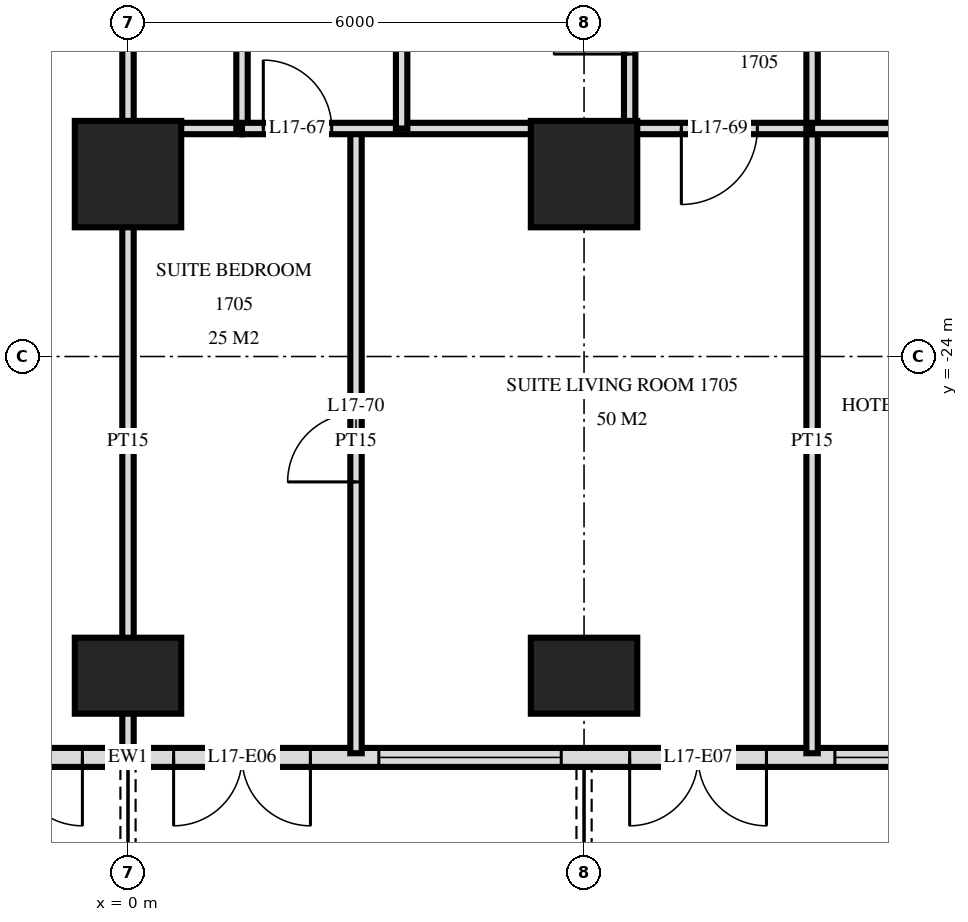
"""IFC4 building model, lengths in metres.
Left out: names, types, materials, properties, quantities, classifications, styles, units other than length and angle.
Written with IfcOpenShell. Run it as: python <this file> out.ifc"""

import sys

from ifc_helpers import new_model, si_unit, direction, frame, frame_2d, origin, origin_2d, place, context, subcontext, project, spatial, rectangle, extrude, element, fill, save


model = new_model("IFC4")
c1 = context("Model", 3, precision=1e-05, world=origin(), true_north=direction((0.0, 1.0)))
c2 = subcontext(c1, "Body", "Model", "MODEL_VIEW")
j1 = project(units=[si_unit("LENGTHUNIT", "METRE"), si_unit("PLANEANGLEUNIT", "RADIAN")], contexts=[c1])
p1 = place(None, origin())
s1 = spatial("IfcSite", under=j1, at=p1, CompositionType="ELEMENT")
p2 = place(p1, origin())
s2 = spatial("IfcBuilding", under=s1, at=p2, CompositionType="ELEMENT")
p3 = place(p2, frame((0.0, 0.0, 70.8)))
s3 = spatial("IfcBuildingStorey", under=s2, at=p3, CompositionType="ELEMENT", Elevation=70.8)
p4 = place(p3, frame((0.0, -28.2, 0.0), z_axis=(0.0, 0.0, 1.0), x_axis=(1.0, 0.0, 0.0)))
e1 = element("IfcColumn", 1, at=p4, inside=s3, PredefinedType="COLUMN", context=c2, shape_type="SweptSolid", body=[
    extrude(rectangle(XDim=1.4, YDim=1.0, at=origin_2d()), origin(), (0.0, 0.0, 1.0), 3.6),
])
p5 = place(p3, frame((0.0, -21.6, 0.0), z_axis=(0.0, 0.0, 1.0), x_axis=(1.0, 0.0, 0.0)))
e2 = element("IfcColumn", 2, at=p5, inside=s3, PredefinedType="COLUMN", context=c2, shape_type="SweptSolid", body=[
    extrude(rectangle(XDim=1.4, YDim=1.4, at=origin_2d()), origin(), (0.0, 0.0, 1.0), 3.6),
])
p6 = place(p3, frame((6.0, -28.2, 0.0), z_axis=(0.0, 0.0, 1.0), x_axis=(1.0, 0.0, 0.0)))
e3 = element("IfcColumn", 3, at=p6, inside=s3, PredefinedType="COLUMN", context=c2, shape_type="SweptSolid", body=[
    extrude(rectangle(XDim=1.4, YDim=1.0, at=origin_2d()), origin(), (0.0, 0.0, 1.0), 3.6),
])
p7 = place(p3, frame((6.0, -21.6, 0.0), z_axis=(0.0, 0.0, 1.0), x_axis=(1.0, 0.0, 0.0)))
e4 = element("IfcColumn", 4, at=p7, inside=s3, PredefinedType="COLUMN", context=c2, shape_type="SweptSolid", body=[
    extrude(rectangle(XDim=1.4, YDim=1.4, at=origin_2d()), origin(), (0.0, 0.0, 1.0), 3.6),
])
p8 = place(p3, frame((-28.775, -29.275, 0.0), z_axis=(0.0, 0.0, 1.0), x_axis=(1.0, 0.0, 0.0)))
e5 = element("IfcWall", 5, at=p8, inside=s3, PredefinedType="SOLIDWALL", context=c2, shape_type="SweptSolid", body=[
    extrude(rectangle(XDim=57.551, YDim=0.25, at=frame_2d((28.775, 0.0))), origin(), (0.0, 0.0, 1.0), 3.32),
])
p9 = place(p8, frame((0.575, 0.0, 0.0)))
e6 = element("IfcOpeningElement", 6, at=p9, cuts=e5, PredefinedType="OPENING", context=c2, shape_type="SweptSolid", body=[
    extrude(rectangle(XDim=1.8, YDim=2.4, at=frame_2d((0.9, 1.2))), frame((0.0, 0.135, 0.0), z_axis=(0.0, -1.0, 0.0), x_axis=(1.0, 0.0, 0.0)), (0.0, 0.0, 1.0), 0.27),
])
p10 = place(p8, frame((5.075, 0.0, 0.3)))
e7 = element("IfcOpeningElement", 7, at=p10, cuts=e5, PredefinedType="OPENING", context=c2, shape_type="SweptSolid", body=[
    extrude(rectangle(XDim=2.4, YDim=2.1, at=frame_2d((1.2, 1.05))), frame((0.0, 0.135, 0.0), z_axis=(0.0, -1.0, 0.0), x_axis=(1.0, 0.0, 0.0)), (0.0, 0.0, 1.0), 0.27),
])
p11 = place(p8, frame((8.375, 0.0, 0.0)))
e8 = element("IfcOpeningElement", 8, at=p11, cuts=e5, PredefinedType="OPENING", context=c2, shape_type="SweptSolid", body=[
    extrude(rectangle(XDim=1.8, YDim=2.4, at=frame_2d((0.9, 1.2))), frame((0.0, 0.135, 0.0), z_axis=(0.0, -1.0, 0.0), x_axis=(1.0, 0.0, 0.0)), (0.0, 0.0, 1.0), 0.27),
])
p12 = place(p8, frame((11.375, 0.0, 0.0)))
e9 = element("IfcOpeningElement", 9, at=p12, cuts=e5, PredefinedType="OPENING", context=c2, shape_type="SweptSolid", body=[
    extrude(rectangle(XDim=1.8, YDim=2.4, at=frame_2d((0.9, 1.2))), frame((0.0, 0.135, 0.0), z_axis=(0.0, -1.0, 0.0), x_axis=(1.0, 0.0, 0.0)), (0.0, 0.0, 1.0), 0.27),
])
p13 = place(p8, frame((14.075, 0.0, 0.3)))
e10 = element("IfcOpeningElement", 10, at=p13, cuts=e5, PredefinedType="OPENING", context=c2, shape_type="SweptSolid", body=[
    extrude(rectangle(XDim=2.4, YDim=2.1, at=frame_2d((1.2, 1.05))), frame((0.0, 0.135, 0.0), z_axis=(0.0, -1.0, 0.0), x_axis=(1.0, 0.0, 0.0)), (0.0, 0.0, 1.0), 0.27),
])
p14 = place(p8, frame((17.375, 0.0, 0.0)))
e11 = element("IfcOpeningElement", 11, at=p14, cuts=e5, PredefinedType="OPENING", context=c2, shape_type="SweptSolid", body=[
    extrude(rectangle(XDim=1.8, YDim=2.4, at=frame_2d((0.9, 1.2))), frame((0.0, 0.135, 0.0), z_axis=(0.0, -1.0, 0.0), x_axis=(1.0, 0.0, 0.0)), (0.0, 0.0, 1.0), 0.27),
])
p15 = place(p8, frame((20.075, 0.0, 0.3)))
e12 = element("IfcOpeningElement", 12, at=p15, cuts=e5, PredefinedType="OPENING", context=c2, shape_type="SweptSolid", body=[
    extrude(rectangle(XDim=2.4, YDim=2.1, at=frame_2d((1.2, 1.05))), frame((0.0, 0.135, 0.0), z_axis=(0.0, -1.0, 0.0), x_axis=(1.0, 0.0, 0.0)), (0.0, 0.0, 1.0), 0.27),
])
p16 = place(p8, frame((23.075, 0.0, 0.3)))
e13 = element("IfcOpeningElement", 13, at=p16, cuts=e5, PredefinedType="OPENING", context=c2, shape_type="SweptSolid", body=[
    extrude(rectangle(XDim=2.4, YDim=2.1, at=frame_2d((1.2, 1.05))), frame((0.0, 0.135, 0.0), z_axis=(0.0, -1.0, 0.0), x_axis=(1.0, 0.0, 0.0)), (0.0, 0.0, 1.0), 0.27),
])
p17 = place(p8, frame((26.375, 0.0, 0.0)))
e14 = element("IfcOpeningElement", 14, at=p17, cuts=e5, PredefinedType="OPENING", context=c2, shape_type="SweptSolid", body=[
    extrude(rectangle(XDim=1.8, YDim=2.4, at=frame_2d((0.9, 1.2))), frame((0.0, 0.135, 0.0), z_axis=(0.0, -1.0, 0.0), x_axis=(1.0, 0.0, 0.0)), (0.0, 0.0, 1.0), 0.27),
])
p18 = place(p8, frame((29.375, 0.0, 0.0)))
e15 = element("IfcOpeningElement", 15, at=p18, cuts=e5, PredefinedType="OPENING", context=c2, shape_type="SweptSolid", body=[
    extrude(rectangle(XDim=1.8, YDim=2.4, at=frame_2d((0.9, 1.2))), frame((0.0, 0.135, 0.0), z_axis=(0.0, -1.0, 0.0), x_axis=(1.0, 0.0, 0.0)), (0.0, 0.0, 1.0), 0.27),
])
p19 = place(p8, frame((32.075, 0.0, 0.3)))
e16 = element("IfcOpeningElement", 16, at=p19, cuts=e5, PredefinedType="OPENING", context=c2, shape_type="SweptSolid", body=[
    extrude(rectangle(XDim=2.4, YDim=2.1, at=frame_2d((1.2, 1.05))), frame((0.0, 0.135, 0.0), z_axis=(0.0, -1.0, 0.0), x_axis=(1.0, 0.0, 0.0)), (0.0, 0.0, 1.0), 0.27),
])
p20 = place(p8, frame((35.375, 0.0, 0.0)))
e17 = element("IfcOpeningElement", 17, at=p20, cuts=e5, PredefinedType="OPENING", context=c2, shape_type="SweptSolid", body=[
    extrude(rectangle(XDim=1.8, YDim=2.4, at=frame_2d((0.9, 1.2))), frame((0.0, 0.135, 0.0), z_axis=(0.0, -1.0, 0.0), x_axis=(1.0, 0.0, 0.0)), (0.0, 0.0, 1.0), 0.27),
])
p21 = place(p8, frame((38.075, 0.0, 0.3)))
e18 = element("IfcOpeningElement", 18, at=p21, cuts=e5, PredefinedType="OPENING", context=c2, shape_type="SweptSolid", body=[
    extrude(rectangle(XDim=2.4, YDim=2.1, at=frame_2d((1.2, 1.05))), frame((0.0, 0.135, 0.0), z_axis=(0.0, -1.0, 0.0), x_axis=(1.0, 0.0, 0.0)), (0.0, 0.0, 1.0), 0.27),
])
p22 = place(p8, frame((41.075, 0.0, 0.3)))
e19 = element("IfcOpeningElement", 19, at=p22, cuts=e5, PredefinedType="OPENING", context=c2, shape_type="SweptSolid", body=[
    extrude(rectangle(XDim=2.4, YDim=2.1, at=frame_2d((1.2, 1.05))), frame((0.0, 0.135, 0.0), z_axis=(0.0, -1.0, 0.0), x_axis=(1.0, 0.0, 0.0)), (0.0, 0.0, 1.0), 0.27),
])
p23 = place(p8, frame((44.375, 0.0, 0.0)))
e20 = element("IfcOpeningElement", 20, at=p23, cuts=e5, PredefinedType="OPENING", context=c2, shape_type="SweptSolid", body=[
    extrude(rectangle(XDim=1.8, YDim=2.4, at=frame_2d((0.9, 1.2))), frame((0.0, 0.135, 0.0), z_axis=(0.0, -1.0, 0.0), x_axis=(1.0, 0.0, 0.0)), (0.0, 0.0, 1.0), 0.27),
])
p24 = place(p8, frame((47.075, 0.0, 0.3)))
e21 = element("IfcOpeningElement", 21, at=p24, cuts=e5, PredefinedType="OPENING", context=c2, shape_type="SweptSolid", body=[
    extrude(rectangle(XDim=2.4, YDim=2.1, at=frame_2d((1.2, 1.05))), frame((0.0, 0.135, 0.0), z_axis=(0.0, -1.0, 0.0), x_axis=(1.0, 0.0, 0.0)), (0.0, 0.0, 1.0), 0.27),
])
p25 = place(p8, frame((50.375, 0.0, 0.0)))
e22 = element("IfcOpeningElement", 22, at=p25, cuts=e5, PredefinedType="OPENING", context=c2, shape_type="SweptSolid", body=[
    extrude(rectangle(XDim=1.8, YDim=2.4, at=frame_2d((0.9, 1.2))), frame((0.0, 0.135, 0.0), z_axis=(0.0, -1.0, 0.0), x_axis=(1.0, 0.0, 0.0)), (0.0, 0.0, 1.0), 0.27),
])
p26 = place(p8, frame((53.375, 0.0, 0.0)))
e23 = element("IfcOpeningElement", 23, at=p26, cuts=e5, PredefinedType="OPENING", context=c2, shape_type="SweptSolid", body=[
    extrude(rectangle(XDim=1.8, YDim=2.4, at=frame_2d((0.9, 1.2))), frame((0.0, 0.135, 0.0), z_axis=(0.0, -1.0, 0.0), x_axis=(1.0, 0.0, 0.0)), (0.0, 0.0, 1.0), 0.27),
])
p27 = place(p3, frame((9.0, -21.0, 0.0), z_axis=(0.0, 0.0, 1.0), x_axis=(0.0, 1.0, 0.0)))
e24 = element("IfcWall", 24, at=p27, inside=s3, PredefinedType="PARTITIONING", context=c2, shape_type="SweptSolid", body=[
    extrude(rectangle(XDim=3.0, YDim=0.15, at=frame_2d((1.5, 0.0))), origin(), (0.0, 0.0, 1.0), 3.32),
])
p28 = place(p3, frame((9.0, -29.22, 0.0), z_axis=(0.0, 0.0, 1.0), x_axis=(0.0, 1.0, 0.0)))
e25 = element("IfcWall", 25, at=p28, inside=s3, PredefinedType="PARTITIONING", context=c2, shape_type="SweptSolid", body=[
    extrude(rectangle(XDim=8.22, YDim=0.15, at=frame_2d((4.11, 0.0))), origin(), (0.0, 0.0, 1.0), 3.32),
])
p29 = place(p3, frame((6.6, -21.0, 0.0), z_axis=(0.0, 0.0, 1.0), x_axis=(0.0, 1.0, 0.0)))
e26 = element("IfcWall", 26, at=p29, inside=s3, PredefinedType="PARTITIONING", context=c2, shape_type="SweptSolid", body=[
    extrude(rectangle(XDim=3.0, YDim=0.15, at=frame_2d((1.5, 0.0))), origin(), (0.0, 0.0, 1.0), 3.32),
])
p30 = place(p29, frame((0.98, 0.0, 0.0)))
e27 = element("IfcOpeningElement", 27, at=p30, cuts=e26, PredefinedType="OPENING", context=c2, shape_type="SweptSolid", body=[
    extrude(rectangle(XDim=1.0, YDim=2.1, at=frame_2d((0.5, 1.05))), frame((0.0, 0.085, 0.0), z_axis=(0.0, -1.0, 0.0), x_axis=(1.0, 0.0, 0.0)), (0.0, 0.0, 1.0), 0.17),
])
p31 = place(p3, frame((3.6, -21.0, 0.0), z_axis=(0.0, 0.0, 1.0), x_axis=(0.0, 1.0, 0.0)))
e28 = element("IfcWall", 28, at=p31, inside=s3, PredefinedType="PARTITIONING", context=c2, shape_type="SweptSolid", body=[
    extrude(rectangle(XDim=3.0, YDim=0.15, at=frame_2d((1.5, 0.0))), origin(), (0.0, 0.0, 1.0), 3.32),
])
p32 = place(p3, frame((3.0, -29.22, 0.0), z_axis=(0.0, 0.0, 1.0), x_axis=(0.0, 1.0, 0.0)))
e29 = element("IfcWall", 29, at=p32, inside=s3, PredefinedType="PARTITIONING", context=c2, shape_type="SweptSolid", body=[
    extrude(rectangle(XDim=8.22, YDim=0.15, at=frame_2d((4.11, 0.0))), origin(), (0.0, 0.0, 1.0), 3.32),
])
p33 = place(p32, frame((3.57, 0.0, 0.0)))
e30 = element("IfcOpeningElement", 30, at=p33, cuts=e29, PredefinedType="OPENING", context=c2, shape_type="SweptSolid", body=[
    extrude(rectangle(XDim=0.9, YDim=2.1, at=frame_2d((0.45, 1.05))), frame((0.0, 0.085, 0.0), z_axis=(0.0, -1.0, 0.0), x_axis=(1.0, 0.0, 0.0)), (0.0, 0.0, 1.0), 0.17),
])
p34 = place(p3, frame((1.5, -21.0, 0.0), z_axis=(0.0, 0.0, 1.0), x_axis=(0.0, 1.0, 0.0)))
e31 = element("IfcWall", 31, at=p34, inside=s3, PredefinedType="PLUMBINGWALL", context=c2, shape_type="SweptSolid", body=[
    extrude(rectangle(XDim=3.0, YDim=0.15, at=frame_2d((1.5, 0.0))), origin(), (0.0, 0.0, 1.0), 3.32),
])
p35 = place(p34, frame((1.08, 0.0, 0.0)))
e32 = element("IfcOpeningElement", 32, at=p35, cuts=e31, PredefinedType="OPENING", context=c2, shape_type="SweptSolid", body=[
    extrude(rectangle(XDim=0.8, YDim=2.1, at=frame_2d((0.4, 1.05))), frame((0.0, 0.085, 0.0), z_axis=(0.0, -1.0, 0.0), x_axis=(1.0, 0.0, 0.0)), (0.0, 0.0, 1.0), 0.17),
])
p36 = place(p3, frame((0.0, -29.22, 0.0), z_axis=(0.0, 0.0, 1.0), x_axis=(0.0, 1.0, 0.0)))
e33 = element("IfcWall", 33, at=p36, inside=s3, PredefinedType="PARTITIONING", context=c2, shape_type="SweptSolid", body=[
    extrude(rectangle(XDim=8.22, YDim=0.15, at=frame_2d((4.11, 0.0))), origin(), (0.0, 0.0, 1.0), 3.32),
])
p37 = place(p3, frame((0.0, -21.0, 0.0), z_axis=(0.0, 0.0, 1.0), x_axis=(0.0, 1.0, 0.0)))
e34 = element("IfcWall", 34, at=p37, inside=s3, PredefinedType="PLUMBINGWALL", context=c2, shape_type="SweptSolid", body=[
    extrude(rectangle(XDim=3.0, YDim=0.15, at=frame_2d((1.5, 0.0))), origin(), (0.0, 0.0, 1.0), 3.32),
])
p38 = place(p3, frame((6.6, -21.0, 0.0), z_axis=(0.0, 0.0, 1.0), x_axis=(1.0, 0.0, 0.0)))
e35 = element("IfcWall", 35, at=p38, inside=s3, PredefinedType="PARTITIONING", context=c2, shape_type="SweptSolid", body=[
    extrude(rectangle(XDim=2.4, YDim=0.15, at=frame_2d((1.2, 0.0))), origin(), (0.0, 0.0, 1.0), 3.32),
])
p39 = place(p38, frame((0.68, 0.0, 0.0)))
e36 = element("IfcOpeningElement", 36, at=p39, cuts=e35, PredefinedType="OPENING", context=c2, shape_type="SweptSolid", body=[
    extrude(rectangle(XDim=1.0, YDim=2.1, at=frame_2d((0.5, 1.05))), frame((0.0, 0.085, 0.0), z_axis=(0.0, -1.0, 0.0), x_axis=(1.0, 0.0, 0.0)), (0.0, 0.0, 1.0), 0.17),
])
p40 = place(p3, frame((1.5, -21.0, 0.0), z_axis=(0.0, 0.0, 1.0), x_axis=(1.0, 0.0, 0.0)))
e37 = element("IfcWall", 37, at=p40, inside=s3, PredefinedType="PARTITIONING", context=c2, shape_type="SweptSolid", body=[
    extrude(rectangle(XDim=5.1, YDim=0.15, at=frame_2d((2.55, 0.0))), origin(), (0.0, 0.0, 1.0), 3.32),
])
p41 = place(p40, frame((0.28, 0.0, 0.0)))
e38 = element("IfcOpeningElement", 38, at=p41, cuts=e37, PredefinedType="OPENING", context=c2, shape_type="SweptSolid", body=[
    extrude(rectangle(XDim=0.9, YDim=2.1, at=frame_2d((0.45, 1.05))), frame((0.0, 0.085, 0.0), z_axis=(0.0, -1.0, 0.0), x_axis=(1.0, 0.0, 0.0)), (0.0, 0.0, 1.0), 0.17),
])
p42 = place(p3, frame((9.0, -21.0, 0.0), z_axis=(0.0, 0.0, 1.0), x_axis=(1.0, 0.0, 0.0)))
e39 = element("IfcWall", 39, at=p42, inside=s3, PredefinedType="PARTITIONING", context=c2, shape_type="SweptSolid", body=[
    extrude(rectangle(XDim=1.7, YDim=0.15, at=frame_2d((0.85, 0.0))), origin(), (0.0, 0.0, 1.0), 3.32),
])
p43 = place(p3, frame((0.0, -21.0, 0.0), z_axis=(0.0, 0.0, 1.0), x_axis=(1.0, 0.0, 0.0)))
e40 = element("IfcWall", 40, at=p43, inside=s3, PredefinedType="PLUMBINGWALL", context=c2, shape_type="SweptSolid", body=[
    extrude(rectangle(XDim=1.5, YDim=0.15, at=frame_2d((0.75, 0.0))), origin(), (0.0, 0.0, 1.0), 3.32),
])
p44 = place(p17, frame((0.9, 0.0, 0.0), z_axis=(0.0, 0.0, 1.0), x_axis=(-1.0, 0.0, 0.0)))
e41 = element("IfcDoor", 41, at=p44, inside=s3, OperationType="DOUBLE_DOOR_SINGLE_SWING", PredefinedType="DOOR", context=c2, shape_type="SweptSolid", body=[
    extrude(rectangle(XDim=1.8, YDim=2.4, at=frame_2d((0.0, 1.2))), frame((0.0, -0.025, 0.0), z_axis=(0.0, 1.0, 0.0), x_axis=(-1.0, 0.0, 0.0)), (0.0, 0.0, 1.0), 0.05),
])
fill(e14, e41)
p45 = place(p18, frame((0.9, 0.0, 0.0), z_axis=(0.0, 0.0, 1.0), x_axis=(-1.0, 0.0, 0.0)))
e42 = element("IfcDoor", 42, at=p45, inside=s3, OperationType="DOUBLE_DOOR_SINGLE_SWING", PredefinedType="DOOR", context=c2, shape_type="SweptSolid", body=[
    extrude(rectangle(XDim=1.8, YDim=2.4, at=frame_2d((0.0, 1.2))), frame((0.0, -0.025, 0.0), z_axis=(0.0, 1.0, 0.0), x_axis=(-1.0, 0.0, 0.0)), (0.0, 0.0, 1.0), 0.05),
])
fill(e15, e42)
p46 = place(p19, origin())
e43 = element("IfcWindow", 43, at=p46, inside=s3, PartitioningType="SINGLE_PANEL", PredefinedType="WINDOW", context=c2, shape_type="SweptSolid", body=[
    extrude(rectangle(XDim=2.4, YDim=2.1, at=frame_2d((1.2, 1.05))), frame((0.0, 0.03, 0.0), z_axis=(0.0, -1.0, 0.0), x_axis=(1.0, 0.0, 0.0)), (0.0, 0.0, 1.0), 0.06),
])
fill(e16, e43)
p47 = place(p20, frame((0.9, 0.0, 0.0), z_axis=(0.0, 0.0, 1.0), x_axis=(-1.0, 0.0, 0.0)))
e44 = element("IfcDoor", 44, at=p47, inside=s3, OperationType="DOUBLE_DOOR_SINGLE_SWING", PredefinedType="DOOR", context=c2, shape_type="SweptSolid", body=[
    extrude(rectangle(XDim=1.8, YDim=2.4, at=frame_2d((0.0, 1.2))), frame((0.0, -0.025, 0.0), z_axis=(0.0, 1.0, 0.0), x_axis=(-1.0, 0.0, 0.0)), (0.0, 0.0, 1.0), 0.05),
])
fill(e17, e44)
p48 = place(p21, origin())
e45 = element("IfcWindow", 45, at=p48, inside=s3, PartitioningType="SINGLE_PANEL", PredefinedType="WINDOW", context=c2, shape_type="SweptSolid", body=[
    extrude(rectangle(XDim=2.4, YDim=2.1, at=frame_2d((1.2, 1.05))), frame((0.0, 0.03, 0.0), z_axis=(0.0, -1.0, 0.0), x_axis=(1.0, 0.0, 0.0)), (0.0, 0.0, 1.0), 0.06),
])
fill(e18, e45)
p49 = place(p41, origin())
e46 = element("IfcDoor", 46, at=p49, inside=s3, OperationType="SINGLE_SWING_RIGHT", PredefinedType="DOOR", context=c2, shape_type="SweptSolid", body=[
    extrude(rectangle(XDim=0.9, YDim=2.1, at=frame_2d((0.45, 1.05))), frame((0.0, 0.025, 0.0), z_axis=(0.0, -1.0, 0.0), x_axis=(1.0, 0.0, 0.0)), (0.0, 0.0, 1.0), 0.05),
])
fill(e38, e46)
p50 = place(p30, origin())
e47 = element("IfcDoor", 47, at=p50, inside=s3, OperationType="SINGLE_SWING_RIGHT", PredefinedType="DOOR", context=c2, shape_type="SweptSolid", body=[
    extrude(rectangle(XDim=1.0, YDim=2.1, at=frame_2d((0.5, 1.05))), frame((0.0, 0.025, 0.0), z_axis=(0.0, -1.0, 0.0), x_axis=(1.0, 0.0, 0.0)), (0.0, 0.0, 1.0), 0.05),
])
fill(e27, e47)
p51 = place(p39, frame((0.5, 0.0, 0.0), z_axis=(0.0, 0.0, 1.0), x_axis=(-1.0, 0.0, 0.0)))
e48 = element("IfcDoor", 48, at=p51, inside=s3, OperationType="SINGLE_SWING_LEFT", PredefinedType="DOOR", context=c2, shape_type="SweptSolid", body=[
    extrude(rectangle(XDim=1.0, YDim=2.1, at=frame_2d((0.0, 1.05))), frame((0.0, -0.025, 0.0), z_axis=(0.0, 1.0, 0.0), x_axis=(-1.0, 0.0, 0.0)), (0.0, 0.0, 1.0), 0.05),
])
fill(e36, e48)
p52 = place(p33, origin())
e49 = element("IfcDoor", 49, at=p52, inside=s3, OperationType="SINGLE_SWING_RIGHT", PredefinedType="DOOR", context=c2, shape_type="SweptSolid", body=[
    extrude(rectangle(XDim=0.9, YDim=2.1, at=frame_2d((0.45, 1.05))), frame((0.0, 0.025, 0.0), z_axis=(0.0, -1.0, 0.0), x_axis=(1.0, 0.0, 0.0)), (0.0, 0.0, 1.0), 0.05),
])
fill(e30, e49)
save(model, sys.argv[1])
